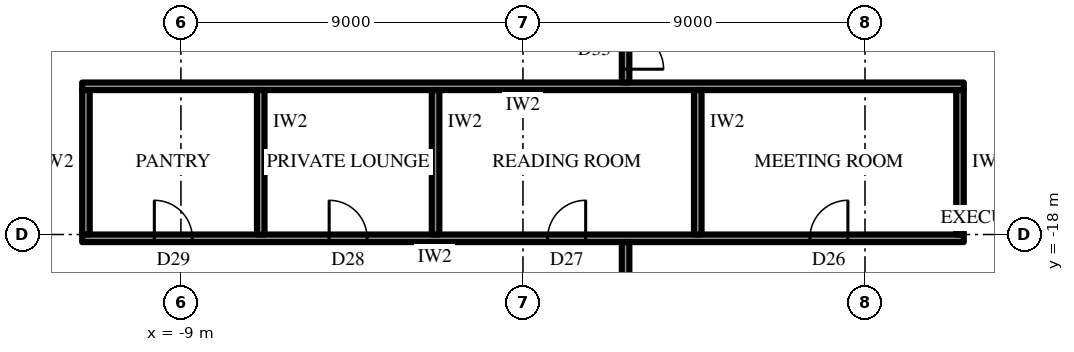
"""IFC4 building model, lengths in metres.
Left out: names, types, materials, properties, quantities, classifications, styles, units other than length and angle.
Written with IfcOpenShell. Run it as: python <this file> out.ifc"""

import sys

from ifc_helpers import new_model, si_unit, direction, frame, frame_2d, origin, place, context, subcontext, project, spatial, rectangle, extrude, element, fill, save


model = new_model("IFC4")
c1 = context("Model", 3, precision=1e-05, world=origin(), true_north=direction((0.0, 1.0)))
c2 = subcontext(c1, "Body", "Model", "MODEL_VIEW")
j1 = project(units=[si_unit("LENGTHUNIT", "METRE"), si_unit("PLANEANGLEUNIT", "RADIAN")], contexts=[c1])
p1 = place(None, origin())
s1 = spatial("IfcSite", under=j1, at=p1, CompositionType="ELEMENT")
p2 = place(p1, origin())
s2 = spatial("IfcBuilding", under=s1, at=p2, CompositionType="ELEMENT")
p3 = place(p2, frame((0.0, 0.0, 332.5)))
s3 = spatial("IfcBuildingStorey", under=s2, at=p3, CompositionType="ELEMENT", Elevation=332.5)
p4 = place(p3, frame((11.6, -14.1, 0.0), z_axis=(0.0, 0.0, 1.0), x_axis=(-1.0, 0.0, 0.0)))
e1 = element("IfcWall", 1, at=p4, inside=s3, PredefinedType="PARTITIONING", context=c2, shape_type="SweptSolid", body=[
    extrude(rectangle(XDim=23.2, YDim=0.2, at=frame_2d((11.6, 0.0))), origin(), (0.0, 0.0, 1.0), 4.0),
])
p5 = place(p3, frame((11.6, -18.1, 0.0), z_axis=(0.0, 0.0, 1.0), x_axis=(-1.0, 0.0, 0.0)))
e2 = element("IfcWall", 2, at=p5, inside=s3, PredefinedType="PARTITIONING", context=c2, shape_type="SweptSolid", body=[
    extrude(rectangle(XDim=23.2, YDim=0.2, at=frame_2d((11.6, 0.0))), origin(), (0.0, 0.0, 1.0), 4.0),
])
p6 = place(p5, frame((3.05, 0.0, 0.0)))
e3 = element("IfcOpeningElement", 3, at=p6, cuts=e2, PredefinedType="OPENING", context=c2, shape_type="SweptSolid", body=[
    extrude(rectangle(XDim=1.0, YDim=2.2, at=frame_2d((0.5, 1.1))), frame((0.0, 0.11, 0.0), z_axis=(0.0, -1.0, 0.0), x_axis=(1.0, 0.0, 0.0)), (0.0, 0.0, 1.0), 0.22),
])
p7 = place(p5, frame((9.95, 0.0, 0.0)))
e4 = element("IfcOpeningElement", 4, at=p7, cuts=e2, PredefinedType="OPENING", context=c2, shape_type="SweptSolid", body=[
    extrude(rectangle(XDim=1.0, YDim=2.2, at=frame_2d((0.5, 1.1))), frame((0.0, 0.11, 0.0), z_axis=(0.0, -1.0, 0.0), x_axis=(1.0, 0.0, 0.0)), (0.0, 0.0, 1.0), 0.22),
])
p8 = place(p5, frame((15.7, 0.0, 0.0)))
e5 = element("IfcOpeningElement", 5, at=p8, cuts=e2, PredefinedType="OPENING", context=c2, shape_type="SweptSolid", body=[
    extrude(rectangle(XDim=1.0, YDim=2.2, at=frame_2d((0.5, 1.1))), frame((0.0, 0.11, 0.0), z_axis=(0.0, -1.0, 0.0), x_axis=(1.0, 0.0, 0.0)), (0.0, 0.0, 1.0), 0.22),
])
p9 = place(p5, frame((20.3, 0.0, 0.0)))
e6 = element("IfcOpeningElement", 6, at=p9, cuts=e2, PredefinedType="OPENING", context=c2, shape_type="SweptSolid", body=[
    extrude(rectangle(XDim=1.0, YDim=2.2, at=frame_2d((0.5, 1.1))), frame((0.0, 0.11, 0.0), z_axis=(0.0, -1.0, 0.0), x_axis=(1.0, 0.0, 0.0)), (0.0, 0.0, 1.0), 0.22),
])
for number, where, z_axis, x_axis in (
    (7, (11.5, -14.2, 0.0), (0.0, 0.0, 1.0), (0.0, -1.0, 0.0)),
    (8, (4.6, -14.2, 0.0), (0.0, 0.0, 1.0), (0.0, -1.0, 0.0)),
    (9, (-2.3, -14.2, 0.0), (0.0, 0.0, 1.0), (0.0, -1.0, 0.0)),
    (10, (-6.9, -14.2, 0.0), (0.0, 0.0, 1.0), (0.0, -1.0, 0.0)),
    (11, (-11.5, -14.2, 0.0), (0.0, 0.0, 1.0), (0.0, -1.0, 0.0)),
):
    element("IfcWall", number, at=place(p3, frame(where, z_axis=z_axis, x_axis=x_axis)), inside=s3, PredefinedType="PARTITIONING", context=c2, shape_type="SweptSolid", body=[
        extrude(rectangle(XDim=3.8, YDim=0.2, at=frame_2d((1.9, 0.0))), origin(), (0.0, 0.0, 1.0), 4.0),
    ])
p10 = place(p3, frame((2.7, -12.3, 0.0), z_axis=(0.0, 0.0, 1.0), x_axis=(0.0, -1.0, 0.0)))
e12 = element("IfcWall", 12, at=p10, inside=s3, PredefinedType="PARTITIONING", context=c2, shape_type="SweptSolid", body=[
    extrude(rectangle(XDim=1.7, YDim=0.2, at=frame_2d((0.85, 0.0))), origin(), (0.0, 0.0, 1.0), 4.0),
])
p11 = place(p10, frame((0.35, 0.0, 0.0)))
e13 = element("IfcOpeningElement", 13, at=p11, cuts=e12, PredefinedType="OPENING", context=c2, shape_type="SweptSolid", body=[
    extrude(rectangle(XDim=1.0, YDim=2.2, at=frame_2d((0.5, 1.1))), frame((0.0, 0.11, 0.0), z_axis=(0.0, -1.0, 0.0), x_axis=(1.0, 0.0, 0.0)), (0.0, 0.0, 1.0), 0.22),
])
p12 = place(p3, frame((2.7, -18.2, 0.0), z_axis=(0.0, 0.0, 1.0), x_axis=(0.0, -1.0, 0.0)))
e14 = element("IfcWall", 14, at=p12, inside=s3, PredefinedType="PARTITIONING", context=c2, shape_type="SweptSolid", body=[
    extrude(rectangle(XDim=8.35, YDim=0.2, at=frame_2d((4.175, 0.0))), origin(), (0.0, 0.0, 1.0), 4.0),
])
p13 = place(p6, frame((1.0, 0.0, 0.0), z_axis=(0.0, 0.0, 1.0), x_axis=(-1.0, 0.0, 0.0)))
e15 = element("IfcDoor", 15, at=p13, inside=s3, OperationType="SINGLE_SWING_LEFT", PredefinedType="DOOR", context=c2, shape_type="SweptSolid", body=[
    extrude(rectangle(XDim=1.0, YDim=2.2, at=frame_2d((0.5, 1.1))), frame((0.0, 0.025, 0.0), z_axis=(0.0, -1.0, 0.0), x_axis=(1.0, 0.0, 0.0)), (0.0, 0.0, 1.0), 0.05),
])
fill(e3, e15)
p14 = place(p7, frame((1.0, 0.0, 0.0), z_axis=(0.0, 0.0, 1.0), x_axis=(-1.0, 0.0, 0.0)))
e16 = element("IfcDoor", 16, at=p14, inside=s3, OperationType="SINGLE_SWING_LEFT", PredefinedType="DOOR", context=c2, shape_type="SweptSolid", body=[
    extrude(rectangle(XDim=1.0, YDim=2.2, at=frame_2d((0.5, 1.1))), frame((0.0, 0.025, 0.0), z_axis=(0.0, -1.0, 0.0), x_axis=(1.0, 0.0, 0.0)), (0.0, 0.0, 1.0), 0.05),
])
fill(e4, e16)
p15 = place(p8, frame((1.0, 0.0, 0.0), z_axis=(0.0, 0.0, 1.0), x_axis=(-1.0, 0.0, 0.0)))
e17 = element("IfcDoor", 17, at=p15, inside=s3, OperationType="SINGLE_SWING_RIGHT", PredefinedType="DOOR", context=c2, shape_type="SweptSolid", body=[
    extrude(rectangle(XDim=1.0, YDim=2.2, at=frame_2d((0.5, 1.1))), frame((0.0, 0.025, 0.0), z_axis=(0.0, -1.0, 0.0), x_axis=(1.0, 0.0, 0.0)), (0.0, 0.0, 1.0), 0.05),
])
fill(e5, e17)
p16 = place(p9, frame((1.0, 0.0, 0.0), z_axis=(0.0, 0.0, 1.0), x_axis=(-1.0, 0.0, 0.0)))
e18 = element("IfcDoor", 18, at=p16, inside=s3, OperationType="SINGLE_SWING_RIGHT", PredefinedType="DOOR", context=c2, shape_type="SweptSolid", body=[
    extrude(rectangle(XDim=1.0, YDim=2.2, at=frame_2d((0.5, 1.1))), frame((0.0, 0.025, 0.0), z_axis=(0.0, -1.0, 0.0), x_axis=(1.0, 0.0, 0.0)), (0.0, 0.0, 1.0), 0.05),
])
fill(e6, e18)
p17 = place(p11, origin())
e19 = element("IfcDoor", 19, at=p17, inside=s3, OperationType="SINGLE_SWING_LEFT", PredefinedType="DOOR", context=c2, shape_type="SweptSolid", body=[
    extrude(rectangle(XDim=1.0, YDim=2.2, at=frame_2d((0.5, 1.1))), frame((0.0, 0.025, 0.0), z_axis=(0.0, -1.0, 0.0), x_axis=(1.0, 0.0, 0.0)), (0.0, 0.0, 1.0), 0.05),
])
fill(e13, e19)
save(model, sys.argv[1])
